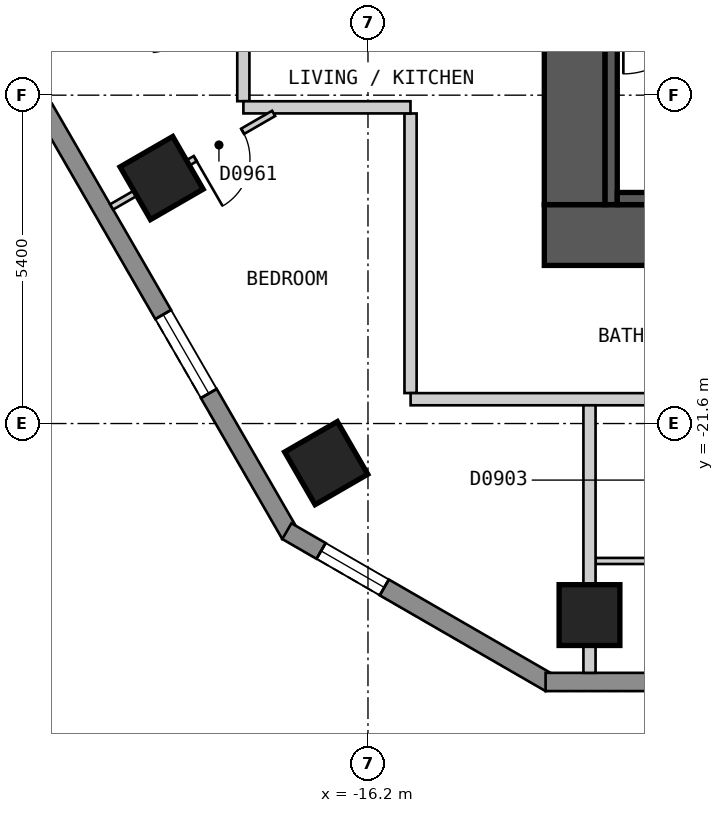
"""IFC4 building model, lengths in metres.
Left out: names, types, materials, properties, quantities, classifications, styles, units other than length and angle.
Written with IfcOpenShell. Run it as: python <this file> out.ifc"""

import sys

from ifc_helpers import new_model, si_unit, direction, frame, frame_2d, origin, origin_2d, place, context, subcontext, project, spatial, polyline, rectangle, outline, extrude, element, fill, save


model = new_model("IFC4")
c1 = context("Model", 3, precision=1e-05, world=origin(), true_north=direction((0.0, 1.0)))
c2 = subcontext(c1, "Body", "Model", "MODEL_VIEW")
j1 = project(units=[si_unit("LENGTHUNIT", "METRE"), si_unit("PLANEANGLEUNIT", "RADIAN")], contexts=[c1])
p1 = place(None, origin())
s1 = spatial("IfcSite", under=j1, at=p1, CompositionType="ELEMENT")
p2 = place(p1, origin())
s2 = spatial("IfcBuilding", under=s1, at=p2, CompositionType="ELEMENT")
p3 = place(p2, frame((0.0, 0.0, 90.0)))
s3 = spatial("IfcBuildingStorey", under=s2, at=p3, CompositionType="ELEMENT", Elevation=90.0)
for number, where, z_axis, x_axis in (
    (1, (-19.594, -17.563, 0.0), (0.0, 0.0, 1.0), (0.5, -0.866, 0.0)),
    (2, (-16.887, -22.251, 0.0), (0.0, 0.0, 1.0), (0.5, -0.866, 0.0)),
    (3, (-12.557, -24.75, 0.0), (0.0, 0.0, 1.0), (1.0, 0.0, 0.0)),
):
    element("IfcColumn", number, at=place(p3, frame(where, z_axis=z_axis, x_axis=x_axis)), inside=s3, PredefinedType="COLUMN", context=c2, shape_type="SweptSolid", body=[
        extrude(rectangle(XDim=1.0, YDim=1.0, at=origin_2d()), origin(), (0.0, 0.0, 1.0), 3.0),
    ])
p4 = place(p3, frame((-13.3, -18.5, 0.0), z_axis=(0.0, 0.0, 1.0), x_axis=(1.0, 0.0, 0.0)))
e4 = element("IfcWall", 4, at=p4, inside=s3, PredefinedType="SHEAR", context=c2, shape_type="SweptSolid", body=[
    extrude(rectangle(XDim=26.6, YDim=1.0, at=frame_2d((13.3, 0.0))), origin(), (0.0, 0.0, 1.0), 2.7),
])
p5 = place(p3, frame((-12.8, -18.0, 0.0), z_axis=(0.0, 0.0, 1.0), x_axis=(0.0, 1.0, 0.0)))
e5 = element("IfcWall", 5, at=p5, inside=s3, PredefinedType="SHEAR", context=c2, shape_type="SweptSolid", body=[
    extrude(rectangle(XDim=12.0, YDim=1.0, at=frame_2d((6.0, 0.0))), origin(), (0.0, 0.0, 1.0), 2.7),
])
p6 = place(p5, frame((3.8, 0.0, 0.0)))
e6 = element("IfcOpeningElement", 6, at=p6, cuts=e5, PredefinedType="OPENING", context=c2, shape_type="SweptSolid", body=[
    extrude(rectangle(XDim=1.2, YDim=2.1, at=frame_2d((0.6, 1.05))), frame((0.0, 0.51, 0.0), z_axis=(0.0, -1.0, 0.0), x_axis=(1.0, 0.0, 0.0)), (0.0, 0.0, 1.0), 1.02),
])
p7 = place(p3, frame((-29.027, -3.425, 0.0), z_axis=(0.0, 0.0, 1.0), x_axis=(0.500035407905, -0.866004960056, 0.0)))
e7 = element("IfcWall", 7, at=p7, inside=s3, PredefinedType="SOLIDWALL", context=c2, shape_type="SweptSolid", body=[
    extrude(outline(polyline([(0.0, -0.15), (23.094, -0.15), (23.014, 0.15), (0.08, 0.15), (0.0, -0.15)])), origin(), (0.0, 0.0, 1.0), 2.7),
])
p8 = place(p7, frame((2.677, 0.0, 0.15)))
e8 = element("IfcOpeningElement", 8, at=p8, cuts=e7, PredefinedType="OPENING", context=c2, shape_type="SweptSolid", body=[
    extrude(rectangle(XDim=1.5, YDim=2.1, at=frame_2d((0.75, 1.05))), frame((0.0, 0.16, 0.0), z_axis=(0.0, -1.0, 0.0), x_axis=(1.0, 0.0, 0.0)), (0.0, 0.0, 1.0), 0.32),
])
p9 = place(p7, frame((8.091, 0.0, 0.15)))
e9 = element("IfcOpeningElement", 9, at=p9, cuts=e7, PredefinedType="OPENING", context=c2, shape_type="SweptSolid", body=[
    extrude(rectangle(XDim=1.5, YDim=2.1, at=frame_2d((0.75, 1.05))), frame((0.0, 0.16, 0.0), z_axis=(0.0, -1.0, 0.0), x_axis=(1.0, 0.0, 0.0)), (0.0, 0.0, 1.0), 0.32),
])
p10 = place(p7, frame((13.504, 0.0, 0.15)))
e10 = element("IfcOpeningElement", 10, at=p10, cuts=e7, PredefinedType="OPENING", context=c2, shape_type="SweptSolid", body=[
    extrude(rectangle(XDim=1.5, YDim=2.1, at=frame_2d((0.75, 1.05))), frame((0.0, 0.16, 0.0), z_axis=(0.0, -1.0, 0.0), x_axis=(1.0, 0.0, 0.0)), (0.0, 0.0, 1.0), 0.32),
])
p11 = place(p7, frame((18.917, 0.0, 0.15)))
e11 = element("IfcOpeningElement", 11, at=p11, cuts=e7, PredefinedType="OPENING", context=c2, shape_type="SweptSolid", body=[
    extrude(rectangle(XDim=1.5, YDim=2.1, at=frame_2d((0.75, 1.05))), frame((0.0, 0.16, 0.0), z_axis=(0.0, -1.0, 0.0), x_axis=(1.0, 0.0, 0.0)), (0.0, 0.0, 1.0), 0.32),
])
p12 = place(p3, frame((-17.534, -23.37, 0.0), z_axis=(0.0, 0.0, 1.0), x_axis=(0.866010750942, -0.50002537861, 0.0)))
e12 = element("IfcWall", 12, at=p12, inside=s3, PredefinedType="SOLIDWALL", context=c2, shape_type="SweptSolid", body=[
    extrude(outline(polyline([(0.0, -0.15), (5.0, -0.15), (4.919, 0.15), (0.08, 0.15), (0.0, -0.15)])), origin(), (0.0, 0.0, 1.0), 2.7),
])
p13 = place(p12, frame((0.65, 0.0, 0.15)))
e13 = element("IfcOpeningElement", 13, at=p13, cuts=e12, PredefinedType="OPENING", context=c2, shape_type="SweptSolid", body=[
    extrude(rectangle(XDim=1.2, YDim=2.1, at=frame_2d((0.6, 1.05))), frame((0.0, 0.16, 0.0), z_axis=(0.0, -1.0, 0.0), x_axis=(1.0, 0.0, 0.0)), (0.0, 0.0, 1.0), 0.32),
])
p14 = place(p3, frame((-13.279, -25.85, 0.0), z_axis=(0.0, 0.0, 1.0), x_axis=(1.0, 0.0, 0.0)))
e14 = element("IfcWall", 14, at=p14, inside=s3, PredefinedType="SOLIDWALL", context=c2, shape_type="SweptSolid", body=[
    extrude(outline(polyline([(0.0, -0.15), (26.558, -0.15), (26.478, 0.15), (0.08, 0.15), (0.0, -0.15)])), origin(), (0.0, 0.0, 1.0), 2.7),
])
p15 = place(p14, frame((2.483, 0.0, 0.15)))
e15 = element("IfcOpeningElement", 15, at=p15, cuts=e14, PredefinedType="OPENING", context=c2, shape_type="SweptSolid", body=[
    extrude(rectangle(XDim=1.5, YDim=2.1, at=frame_2d((0.75, 1.05))), frame((0.0, 0.16, 0.0), z_axis=(0.0, -1.0, 0.0), x_axis=(1.0, 0.0, 0.0)), (0.0, 0.0, 1.0), 0.32),
])
p16 = place(p14, frame((7.507, 0.0, 0.15)))
e16 = element("IfcOpeningElement", 16, at=p16, cuts=e14, PredefinedType="OPENING", context=c2, shape_type="SweptSolid", body=[
    extrude(rectangle(XDim=1.5, YDim=2.1, at=frame_2d((0.75, 1.05))), frame((0.0, 0.16, 0.0), z_axis=(0.0, -1.0, 0.0), x_axis=(1.0, 0.0, 0.0)), (0.0, 0.0, 1.0), 0.32),
])
p17 = place(p14, frame((12.529, 0.0, 0.15)))
e17 = element("IfcOpeningElement", 17, at=p17, cuts=e14, PredefinedType="OPENING", context=c2, shape_type="SweptSolid", body=[
    extrude(rectangle(XDim=1.5, YDim=2.1, at=frame_2d((0.75, 1.05))), frame((0.0, 0.16, 0.0), z_axis=(0.0, -1.0, 0.0), x_axis=(1.0, 0.0, 0.0)), (0.0, 0.0, 1.0), 0.32),
])
p18 = place(p14, frame((17.553, 0.0, 0.15)))
e18 = element("IfcOpeningElement", 18, at=p18, cuts=e14, PredefinedType="OPENING", context=c2, shape_type="SweptSolid", body=[
    extrude(rectangle(XDim=1.5, YDim=2.1, at=frame_2d((0.75, 1.05))), frame((0.0, 0.16, 0.0), z_axis=(0.0, -1.0, 0.0), x_axis=(1.0, 0.0, 0.0)), (0.0, 0.0, 1.0), 0.32),
])
p19 = place(p14, frame((22.575, 0.0, 0.15)))
e19 = element("IfcOpeningElement", 19, at=p19, cuts=e14, PredefinedType="OPENING", context=c2, shape_type="SweptSolid", body=[
    extrude(rectangle(XDim=1.5, YDim=2.1, at=frame_2d((0.75, 1.05))), frame((0.0, 0.16, 0.0), z_axis=(0.0, -1.0, 0.0), x_axis=(1.0, 0.0, 0.0)), (0.0, 0.0, 1.0), 0.32),
])
p20 = place(p3, frame((-15.5, -16.501, 0.0), z_axis=(0.0, 0.0, 1.0), x_axis=(0.0, -1.0, 0.0)))
e20 = element("IfcWall", 20, at=p20, inside=s3, PredefinedType="PARTITIONING", context=c2, shape_type="SweptSolid", body=[
    extrude(rectangle(XDim=4.598, YDim=0.2, at=frame_2d((2.299, 0.0))), origin(), (0.0, 0.0, 1.0), 2.7),
])
p21 = place(p3, frame((-18.25, -14.486, 0.0), z_axis=(0.0, 0.0, 1.0), x_axis=(0.0, -1.0, 0.0)))
e21 = element("IfcWall", 21, at=p21, inside=s3, PredefinedType="PARTITIONING", context=c2, shape_type="SweptSolid", body=[
    extrude(rectangle(XDim=1.813, YDim=0.2, at=frame_2d((0.906, 0.0))), origin(), (0.0, 0.0, 1.0), 2.7),
])
p22 = place(p3, frame((-18.249, -16.4, 0.0), z_axis=(0.0, 0.0, 1.0), x_axis=(1.0, 0.0, 0.0)))
e22 = element("IfcWall", 22, at=p22, inside=s3, PredefinedType="PARTITIONING", context=c2, shape_type="SweptSolid", body=[
    extrude(rectangle(XDim=2.748, YDim=0.2, at=frame_2d((1.374, 0.0))), origin(), (0.0, 0.0, 1.0), 2.7),
])
p23 = place(p3, frame((-15.499, -21.2, 0.0), z_axis=(0.0, 0.0, 1.0), x_axis=(1.0, 0.0, 0.0)))
e23 = element("IfcWall", 23, at=p23, inside=s3, PredefinedType="PARTITIONING", context=c2, shape_type="SweptSolid", body=[
    extrude(rectangle(XDim=30.898, YDim=0.2, at=frame_2d((15.449, 0.0))), origin(), (0.0, 0.0, 1.0), 2.7),
])
p24 = place(p23, frame((4.954, 0.0, 0.0)))
e24 = element("IfcOpeningElement", 24, at=p24, cuts=e23, PredefinedType="OPENING", context=c2, shape_type="SweptSolid", body=[
    extrude(rectangle(XDim=1.0, YDim=2.1, at=frame_2d((0.5, 1.05))), frame((0.0, 0.11, 0.0), z_axis=(0.0, -1.0, 0.0), x_axis=(1.0, 0.0, 0.0)), (0.0, 0.0, 1.0), 0.22),
])
p25 = place(p23, frame((25.046, 0.0, 0.0)))
e25 = element("IfcOpeningElement", 25, at=p25, cuts=e23, PredefinedType="OPENING", context=c2, shape_type="SweptSolid", body=[
    extrude(rectangle(XDim=1.0, YDim=2.1, at=frame_2d((0.5, 1.05))), frame((0.0, 0.11, 0.0), z_axis=(0.0, -1.0, 0.0), x_axis=(1.0, 0.0, 0.0)), (0.0, 0.0, 1.0), 0.22),
])
p26 = place(p3, frame((-12.457, -23.86, 0.0), z_axis=(0.0, 0.0, 1.0), x_axis=(1.0, 0.0, 0.0)))
e26 = element("IfcWall", 26, at=p26, inside=s3, PredefinedType="PARTITIONING", context=c2, shape_type="SweptSolid", body=[
    extrude(rectangle(XDim=3.114, YDim=0.1, at=frame_2d((1.557, 0.0))), origin(), (0.0, 0.0, 1.0), 2.7),
])
p27 = place(p3, frame((-20.416, -18.038, 0.0), z_axis=(0.0, 0.0, 1.0), x_axis=(0.866026989333, 0.499997253739, 0.0)))
e27 = element("IfcWall", 27, at=p27, inside=s3, PredefinedType="PARTITIONING", context=c2, shape_type="SweptSolid", body=[
    extrude(rectangle(XDim=3.076, YDim=0.1, at=frame_2d((1.538, 0.0))), origin(), (0.0, 0.0, 1.0), 2.7),
])
p28 = place(p27, frame((1.588, 0.0, 0.0)))
e28 = element("IfcOpeningElement", 28, at=p28, cuts=e27, PredefinedType="OPENING", context=c2, shape_type="SweptSolid", body=[
    extrude(rectangle(XDim=0.9, YDim=2.1, at=frame_2d((0.45, 1.05))), frame((0.0, 0.06, 0.0), z_axis=(0.0, -1.0, 0.0), x_axis=(1.0, 0.0, 0.0)), (0.0, 0.0, 1.0), 0.12),
])
p29 = place(p3, frame((-12.557, -25.7, 0.0), z_axis=(0.0, 0.0, 1.0), x_axis=(0.0, 1.0, 0.0)))
e29 = element("IfcWall", 29, at=p29, inside=s3, PredefinedType="PARTITIONING", context=c2, shape_type="SweptSolid", body=[
    extrude(rectangle(XDim=4.4, YDim=0.2, at=frame_2d((2.2, 0.0))), origin(), (0.0, 0.0, 1.0), 2.7),
])
p30 = place(p3, frame((-12.2, -18.0, 0.0), z_axis=(0.0, 0.0, 1.0), x_axis=(0.0, 1.0, 0.0)))
e30 = element("IfcWall", 30, at=p30, inside=s3, PredefinedType="SOLIDWALL", context=c2, shape_type="SweptSolid", body=[
    extrude(rectangle(XDim=3.15, YDim=0.2, at=frame_2d((1.575, 0.0))), origin(), (0.0, 0.0, 1.0), 2.7),
])
p31 = place(p3, frame((-12.1, -17.9, 0.0), z_axis=(0.0, 0.0, 1.0), x_axis=(1.0, 0.0, 0.0)))
e31 = element("IfcWall", 31, at=p31, inside=s3, PredefinedType="SOLIDWALL", context=c2, shape_type="SweptSolid", body=[
    extrude(rectangle(XDim=5.4, YDim=0.2, at=frame_2d((2.7, 0.0))), origin(), (0.0, 0.0, 1.0), 2.7),
])
p32 = place(p11, origin())
e32 = element("IfcWindow", 32, at=p32, inside=s3, PartitioningType="SINGLE_PANEL", PredefinedType="WINDOW", context=c2, shape_type="SweptSolid", body=[
    extrude(rectangle(XDim=1.5, YDim=2.1, at=frame_2d((0.75, 1.05))), frame((0.0, 0.03, 0.0), z_axis=(0.0, -1.0, 0.0), x_axis=(1.0, 0.0, 0.0)), (0.0, 0.0, 1.0), 0.06),
])
fill(e11, e32)
p33 = place(p13, origin())
e33 = element("IfcWindow", 33, at=p33, inside=s3, PartitioningType="SINGLE_PANEL", PredefinedType="WINDOW", context=c2, shape_type="SweptSolid", body=[
    extrude(rectangle(XDim=1.2, YDim=2.1, at=frame_2d((0.6, 1.05))), frame((0.0, 0.03, 0.0), z_axis=(0.0, -1.0, 0.0), x_axis=(1.0, 0.0, 0.0)), (0.0, 0.0, 1.0), 0.06),
])
fill(e13, e33)
p34 = place(p28, origin())
e34 = element("IfcDoor", 34, at=p34, inside=s3, OperationType="SINGLE_SWING_LEFT", PredefinedType="DOOR", context=c2, shape_type="SweptSolid", body=[
    extrude(rectangle(XDim=0.9, YDim=2.1, at=frame_2d((0.45, 1.05))), frame((0.0, 0.025, 0.0), z_axis=(0.0, -1.0, 0.0), x_axis=(1.0, 0.0, 0.0)), (0.0, 0.0, 1.0), 0.05),
])
fill(e28, e34)
save(model, sys.argv[1])
